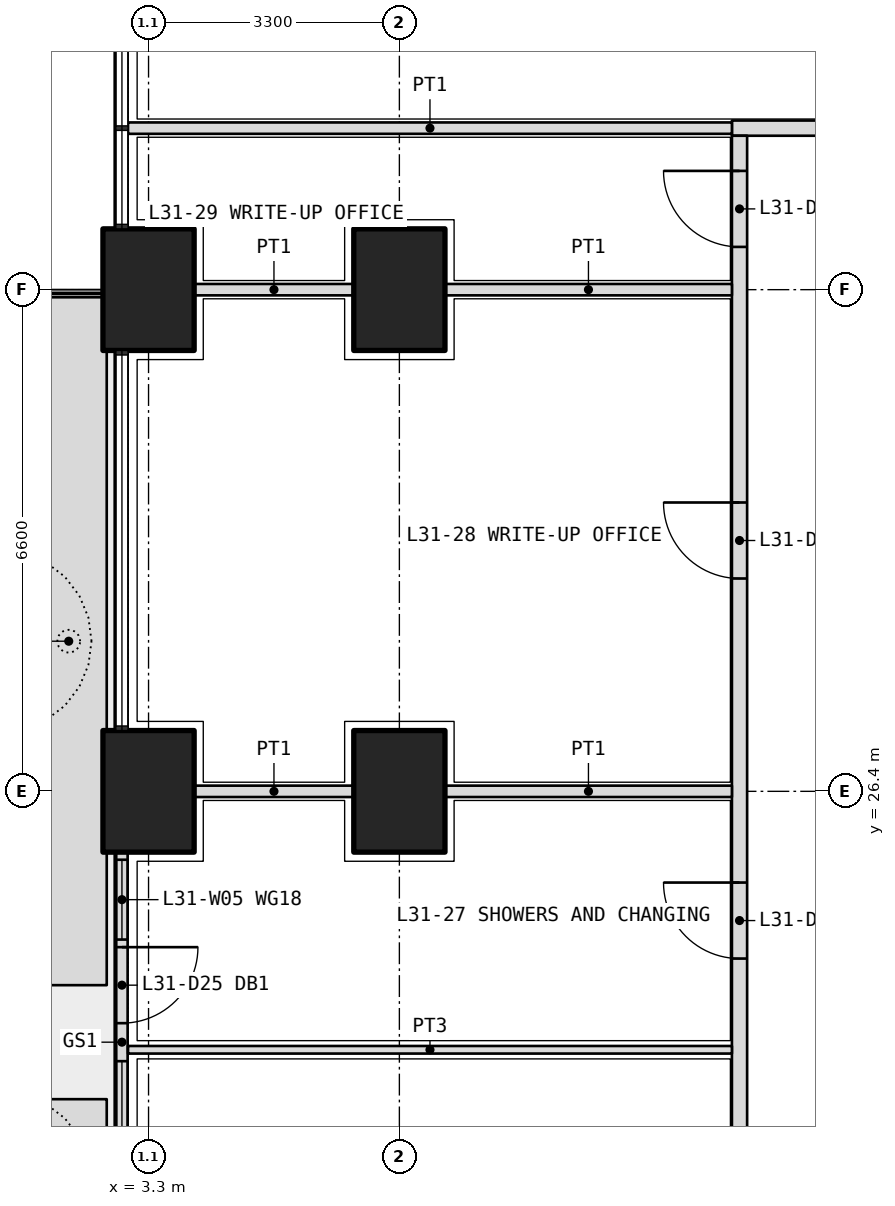
"""IFC4 building model, lengths in metres.
Left out: names, types, materials, properties, quantities, classifications, styles, units other than length and angle.
Written with IfcOpenShell. Run it as: python <this file> out.ifc"""

import sys

from ifc_helpers import new_model, si_unit, direction, frame, frame_2d, origin, origin_2d, place, context, subcontext, project, spatial, polyline, rectangle, outline, extrude, element, fill, save


model = new_model("IFC4")
c1 = context("Model", 3, precision=1e-05, world=origin(), true_north=direction((0.0, 1.0)))
c2 = subcontext(c1, "Body", "Model", "MODEL_VIEW")
j1 = project(units=[si_unit("LENGTHUNIT", "METRE"), si_unit("PLANEANGLEUNIT", "RADIAN")], contexts=[c1])
p1 = place(None, origin())
s1 = spatial("IfcSite", under=j1, at=p1, CompositionType="ELEMENT")
p2 = place(p1, origin())
s2 = spatial("IfcBuilding", under=s1, at=p2, CompositionType="ELEMENT")
p3 = place(p2, frame((0.0, 0.0, 136.8)))
s3 = spatial("IfcBuildingStorey", under=s2, at=p3, CompositionType="ELEMENT", Elevation=136.8)
for number, where, z_axis, x_axis in (
    (1, (3.3, 26.4, 0.0), (0.0, 0.0, 1.0), (0.0, 1.0, 0.0)),
    (2, (3.3, 33.0, 0.0), (0.0, 0.0, 1.0), (0.0, 1.0, 0.0)),
    (3, (6.6, 26.4, 0.0), (0.0, 0.0, 1.0), (0.0, 1.0, 0.0)),
    (4, (6.6, 33.0, 0.0), (0.0, 0.0, 1.0), (0.0, 1.0, 0.0)),
):
    element("IfcColumn", number, at=place(p3, frame(where, z_axis=z_axis, x_axis=x_axis)), inside=s3, PredefinedType="COLUMN", context=c2, shape_type="SweptSolid", body=[
        extrude(rectangle(XDim=1.6, YDim=1.2, at=origin_2d()), origin(), (0.0, 0.0, 1.0), 4.2),
    ])
p4 = place(p3, origin())
e5 = element("IfcWall", 5, at=p4, inside=s3, PredefinedType="USERDEFINED", context=c2, shape_type="SweptSolid", body=[
    extrude(outline(polyline([(1.75, 19.9), (2.75, 19.9), (2.75, 22.35), (1.75, 22.35), (1.75, 19.9)]), holes=[polyline([(1.9, 20.05), (2.6, 20.05), (2.6, 22.2), (1.9, 22.2), (1.9, 20.05)])]), origin(), (0.0, 0.0, 1.0), 1.05),
])
p5 = place(p3, origin())
e6 = element("IfcWall", 6, at=p5, inside=s3, PredefinedType="USERDEFINED", context=c2, shape_type="SweptSolid", body=[
    extrude(outline(polyline([(1.75, 23.85), (2.75, 23.85), (2.75, 32.9), (1.75, 32.9), (1.75, 23.85)]), holes=[polyline([(1.9, 24.0), (2.6, 24.0), (2.6, 32.75), (1.9, 32.75), (1.9, 24.0)])]), origin(), (0.0, 0.0, 1.0), 1.05),
])
p6 = place(p3, frame((2.95, 25.6, 0.0), z_axis=(0.0, 0.0, 1.0), x_axis=(0.0, -1.0, 0.0)))
e7 = element("IfcWall", 7, at=p6, inside=s3, PredefinedType="SOLIDWALL", context=c2, shape_type="SweptSolid", body=[
    extrude(rectangle(XDim=5.0, YDim=0.15, at=frame_2d((2.5, 0.0))), origin(), (0.0, 0.0, 1.0), 2.6),
])
p7 = place(p6, frame((1.25, 0.0, 0.0)))
e8 = element("IfcOpeningElement", 8, at=p7, cuts=e7, PredefinedType="OPENING", context=c2, shape_type="SweptSolid", body=[
    extrude(rectangle(XDim=1.0, YDim=2.4, at=frame_2d((0.5, 1.2))), frame((0.0, 0.085, 0.0), z_axis=(0.0, -1.0, 0.0), x_axis=(1.0, 0.0, 0.0)), (0.0, 0.0, 1.0), 0.17),
])
p8 = place(p6, frame((0.1, 0.0, 0.1)))
e9 = element("IfcOpeningElement", 9, at=p8, cuts=e7, PredefinedType="OPENING", context=c2, shape_type="SweptSolid", body=[
    extrude(rectangle(XDim=1.05, YDim=2.2, at=frame_2d((0.525, 1.1))), frame((0.0, 0.085, 0.0), z_axis=(0.0, -1.0, 0.0), x_axis=(1.0, 0.0, 0.0)), (0.0, 0.0, 1.0), 0.17),
])
p9 = place(p6, frame((2.75, 0.0, 0.1)))
e10 = element("IfcOpeningElement", 10, at=p9, cuts=e7, PredefinedType="OPENING", context=c2, shape_type="SweptSolid", body=[
    extrude(rectangle(XDim=2.15, YDim=2.2, at=frame_2d((1.075, 1.1))), frame((0.0, 0.085, 0.0), z_axis=(0.0, -1.0, 0.0), x_axis=(1.0, 0.0, 0.0)), (0.0, 0.0, 1.0), 0.17),
])
p10 = place(p3, frame((10.975, 35.125, 0.0), z_axis=(0.0, 0.0, 1.0), x_axis=(1.0, 0.0, 0.0)))
e11 = element("IfcWall", 11, at=p10, inside=s3, PredefinedType="PARTITIONING", context=c2, shape_type="SweptSolid", body=[
    extrude(rectangle(XDim=30.85, YDim=0.2, at=frame_2d((15.425, 0.0))), origin(), (0.0, 0.0, 1.0), 2.85),
])
p11 = place(p10, frame((2.312, 0.0, 0.0)))
e12 = element("IfcOpeningElement", 12, at=p11, cuts=e11, PredefinedType="OPENING", context=c2, shape_type="SweptSolid", body=[
    extrude(rectangle(XDim=1.0, YDim=2.1, at=frame_2d((0.5, 1.05))), frame((0.0, 0.11, 0.0), z_axis=(0.0, -1.0, 0.0), x_axis=(1.0, 0.0, 0.0)), (0.0, 0.0, 1.0), 0.22),
])
p12 = place(p10, frame((8.325, 0.0, 0.0)))
e13 = element("IfcOpeningElement", 13, at=p12, cuts=e11, PredefinedType="OPENING", context=c2, shape_type="SweptSolid", body=[
    extrude(rectangle(XDim=1.0, YDim=2.1, at=frame_2d((0.5, 1.05))), frame((0.0, 0.11, 0.0), z_axis=(0.0, -1.0, 0.0), x_axis=(1.0, 0.0, 0.0)), (0.0, 0.0, 1.0), 0.22),
])
p13 = place(p10, frame((13.375, 0.0, 0.0)))
e14 = element("IfcOpeningElement", 14, at=p13, cuts=e11, PredefinedType="OPENING", context=c2, shape_type="SweptSolid", body=[
    extrude(rectangle(XDim=1.0, YDim=2.1, at=frame_2d((0.5, 1.05))), frame((0.0, 0.11, 0.0), z_axis=(0.0, -1.0, 0.0), x_axis=(1.0, 0.0, 0.0)), (0.0, 0.0, 1.0), 0.22),
])
p14 = place(p10, frame((16.675, 0.0, 0.0)))
e15 = element("IfcOpeningElement", 15, at=p14, cuts=e11, PredefinedType="OPENING", context=c2, shape_type="SweptSolid", body=[
    extrude(rectangle(XDim=1.0, YDim=2.1, at=frame_2d((0.5, 1.05))), frame((0.0, 0.11, 0.0), z_axis=(0.0, -1.0, 0.0), x_axis=(1.0, 0.0, 0.0)), (0.0, 0.0, 1.0), 0.22),
])
p15 = place(p10, frame((24.238, 0.0, 0.0)))
e16 = element("IfcOpeningElement", 16, at=p15, cuts=e11, PredefinedType="OPENING", context=c2, shape_type="SweptSolid", body=[
    extrude(rectangle(XDim=1.0, YDim=2.1, at=frame_2d((0.5, 1.05))), frame((0.0, 0.11, 0.0), z_axis=(0.0, -1.0, 0.0), x_axis=(1.0, 0.0, 0.0)), (0.0, 0.0, 1.0), 0.22),
])
p16 = place(p3, frame((11.075, 7.4, 0.0), z_axis=(0.0, 0.0, 1.0), x_axis=(0.0, 1.0, 0.0)))
e17 = element("IfcWall", 17, at=p16, inside=s3, PredefinedType="PARTITIONING", context=c2, shape_type="SweptSolid", body=[
    extrude(rectangle(XDim=27.625, YDim=0.2, at=frame_2d((13.812, 0.0))), origin(), (0.0, 0.0, 1.0), 2.85),
])
p17 = place(p16, frame((2.35, 0.0, 0.0)))
e18 = element("IfcOpeningElement", 18, at=p17, cuts=e17, PredefinedType="OPENING", context=c2, shape_type="SweptSolid", body=[
    extrude(rectangle(XDim=1.0, YDim=2.1, at=frame_2d((0.5, 1.05))), frame((0.0, 0.11, 0.0), z_axis=(0.0, -1.0, 0.0), x_axis=(1.0, 0.0, 0.0)), (0.0, 0.0, 1.0), 0.22),
])
p18 = place(p16, frame((6.35, 0.0, 0.0)))
e19 = element("IfcOpeningElement", 19, at=p18, cuts=e17, PredefinedType="OPENING", context=c2, shape_type="SweptSolid", body=[
    extrude(rectangle(XDim=1.0, YDim=2.1, at=frame_2d((0.5, 1.05))), frame((0.0, 0.11, 0.0), z_axis=(0.0, -1.0, 0.0), x_axis=(1.0, 0.0, 0.0)), (0.0, 0.0, 1.0), 0.22),
])
p19 = place(p16, frame((9.425, 0.0, 0.0)))
e20 = element("IfcOpeningElement", 20, at=p19, cuts=e17, PredefinedType="OPENING", context=c2, shape_type="SweptSolid", body=[
    extrude(rectangle(XDim=0.9, YDim=2.1, at=frame_2d((0.45, 1.05))), frame((0.0, 0.11, 0.0), z_axis=(0.0, -1.0, 0.0), x_axis=(1.0, 0.0, 0.0)), (0.0, 0.0, 1.0), 0.22),
])
p20 = place(p16, frame((13.275, 0.0, 0.0)))
e21 = element("IfcOpeningElement", 21, at=p20, cuts=e17, PredefinedType="OPENING", context=c2, shape_type="SweptSolid", body=[
    extrude(rectangle(XDim=0.9, YDim=2.1, at=frame_2d((0.45, 1.05))), frame((0.0, 0.11, 0.0), z_axis=(0.0, -1.0, 0.0), x_axis=(1.0, 0.0, 0.0)), (0.0, 0.0, 1.0), 0.22),
])
p21 = place(p16, frame((16.8, 0.0, 0.0)))
e22 = element("IfcOpeningElement", 22, at=p21, cuts=e17, PredefinedType="OPENING", context=c2, shape_type="SweptSolid", body=[
    extrude(rectangle(XDim=1.0, YDim=2.1, at=frame_2d((0.5, 1.05))), frame((0.0, 0.11, 0.0), z_axis=(0.0, -1.0, 0.0), x_axis=(1.0, 0.0, 0.0)), (0.0, 0.0, 1.0), 0.22),
])
p22 = place(p16, frame((21.8, 0.0, 0.0)))
e23 = element("IfcOpeningElement", 23, at=p22, cuts=e17, PredefinedType="OPENING", context=c2, shape_type="SweptSolid", body=[
    extrude(rectangle(XDim=1.0, YDim=2.1, at=frame_2d((0.5, 1.05))), frame((0.0, 0.11, 0.0), z_axis=(0.0, -1.0, 0.0), x_axis=(1.0, 0.0, 0.0)), (0.0, 0.0, 1.0), 0.22),
])
p23 = place(p16, frame((26.163, 0.0, 0.0)))
e24 = element("IfcOpeningElement", 24, at=p23, cuts=e17, PredefinedType="OPENING", context=c2, shape_type="SweptSolid", body=[
    extrude(rectangle(XDim=1.0, YDim=2.1, at=frame_2d((0.5, 1.05))), frame((0.0, 0.11, 0.0), z_axis=(0.0, -1.0, 0.0), x_axis=(1.0, 0.0, 0.0)), (0.0, 0.0, 1.0), 0.22),
])
p24 = place(p3, frame((3.03, 35.125, 0.0), z_axis=(0.0, 0.0, 1.0), x_axis=(1.0, 0.0, 0.0)))
e25 = element("IfcWall", 25, at=p24, inside=s3, PredefinedType="PARTITIONING", context=c2, shape_type="SweptSolid", body=[
    extrude(rectangle(XDim=7.945, YDim=0.15, at=frame_2d((3.973, 0.0))), origin(), (0.0, 0.0, 1.0), 2.6),
])
p25 = place(p3, frame((3.03, 23.0, 0.0), z_axis=(0.0, 0.0, 1.0), x_axis=(1.0, 0.0, 0.0)))
e26 = element("IfcWall", 26, at=p25, inside=s3, PredefinedType="PARTITIONING", context=c2, shape_type="SweptSolid", body=[
    extrude(rectangle(XDim=7.945, YDim=0.1, at=frame_2d((3.973, 0.0))), origin(), (0.0, 0.0, 1.0), 2.6),
])
p26 = place(p3, frame((3.9, 26.4, 0.0), z_axis=(0.0, 0.0, 1.0), x_axis=(1.0, 0.0, 0.0)))
e27 = element("IfcWall", 27, at=p26, inside=s3, PredefinedType="PARTITIONING", context=c2, shape_type="SweptSolid", body=[
    extrude(rectangle(XDim=2.1, YDim=0.15, at=frame_2d((1.05, 0.0))), origin(), (0.0, 0.0, 1.0), 2.85),
])
p27 = place(p3, frame((7.2, 26.4, 0.0), z_axis=(0.0, 0.0, 1.0), x_axis=(1.0, 0.0, 0.0)))
e28 = element("IfcWall", 28, at=p27, inside=s3, PredefinedType="PARTITIONING", context=c2, shape_type="SweptSolid", body=[
    extrude(rectangle(XDim=3.775, YDim=0.15, at=frame_2d((1.888, 0.0))), origin(), (0.0, 0.0, 1.0), 2.85),
])
p28 = place(p3, frame((3.9, 33.0, 0.0), z_axis=(0.0, 0.0, 1.0), x_axis=(1.0, 0.0, 0.0)))
e29 = element("IfcWall", 29, at=p28, inside=s3, PredefinedType="PARTITIONING", context=c2, shape_type="SweptSolid", body=[
    extrude(rectangle(XDim=2.1, YDim=0.15, at=frame_2d((1.05, 0.0))), origin(), (0.0, 0.0, 1.0), 2.85),
])
p29 = place(p3, frame((7.2, 33.0, 0.0), z_axis=(0.0, 0.0, 1.0), x_axis=(1.0, 0.0, 0.0)))
e30 = element("IfcWall", 30, at=p29, inside=s3, PredefinedType="PARTITIONING", context=c2, shape_type="SweptSolid", body=[
    extrude(rectangle(XDim=3.775, YDim=0.15, at=frame_2d((1.888, 0.0))), origin(), (0.0, 0.0, 1.0), 2.85),
])
p30 = place(p7, origin())
e31 = element("IfcDoor", 31, at=p30, inside=s3, OperationType="SINGLE_SWING_LEFT", PredefinedType="DOOR", context=c2, shape_type="SweptSolid", body=[
    extrude(rectangle(XDim=1.0, YDim=2.4, at=frame_2d((0.5, 1.2))), frame((0.0, 0.025, 0.0), z_axis=(0.0, -1.0, 0.0), x_axis=(1.0, 0.0, 0.0)), (0.0, 0.0, 1.0), 0.05),
])
fill(e8, e31)
p31 = place(p8, origin())
e32 = element("IfcWindow", 32, at=p31, inside=s3, PartitioningType="SINGLE_PANEL", PredefinedType="WINDOW", context=c2, shape_type="SweptSolid", body=[
    extrude(rectangle(XDim=1.05, YDim=2.2, at=frame_2d((0.525, 1.1))), frame((0.0, 0.03, 0.0), z_axis=(0.0, -1.0, 0.0), x_axis=(1.0, 0.0, 0.0)), (0.0, 0.0, 1.0), 0.06),
])
fill(e9, e32)
p32 = place(p9, origin())
e33 = element("IfcWindow", 33, at=p32, inside=s3, PartitioningType="SINGLE_PANEL", PredefinedType="WINDOW", context=c2, shape_type="SweptSolid", body=[
    extrude(rectangle(XDim=2.15, YDim=2.2, at=frame_2d((1.075, 1.1))), frame((0.0, 0.03, 0.0), z_axis=(0.0, -1.0, 0.0), x_axis=(1.0, 0.0, 0.0)), (0.0, 0.0, 1.0), 0.06),
])
fill(e10, e33)
p33 = place(p21, origin())
e34 = element("IfcDoor", 34, at=p33, inside=s3, OperationType="SINGLE_SWING_RIGHT", PredefinedType="DOOR", context=c2, shape_type="SweptSolid", body=[
    extrude(rectangle(XDim=1.0, YDim=2.1, at=frame_2d((0.5, 1.05))), frame((0.0, 0.025, 0.0), z_axis=(0.0, -1.0, 0.0), x_axis=(1.0, 0.0, 0.0)), (0.0, 0.0, 1.0), 0.05),
])
fill(e22, e34)
p34 = place(p22, origin())
e35 = element("IfcDoor", 35, at=p34, inside=s3, OperationType="SINGLE_SWING_RIGHT", PredefinedType="DOOR", context=c2, shape_type="SweptSolid", body=[
    extrude(rectangle(XDim=1.0, YDim=2.1, at=frame_2d((0.5, 1.05))), frame((0.0, 0.025, 0.0), z_axis=(0.0, -1.0, 0.0), x_axis=(1.0, 0.0, 0.0)), (0.0, 0.0, 1.0), 0.05),
])
fill(e23, e35)
p35 = place(p23, origin())
e36 = element("IfcDoor", 36, at=p35, inside=s3, OperationType="SINGLE_SWING_RIGHT", PredefinedType="DOOR", context=c2, shape_type="SweptSolid", body=[
    extrude(rectangle(XDim=1.0, YDim=2.1, at=frame_2d((0.5, 1.05))), frame((0.0, 0.025, 0.0), z_axis=(0.0, -1.0, 0.0), x_axis=(1.0, 0.0, 0.0)), (0.0, 0.0, 1.0), 0.05),
])
fill(e24, e36)
save(model, sys.argv[1])
